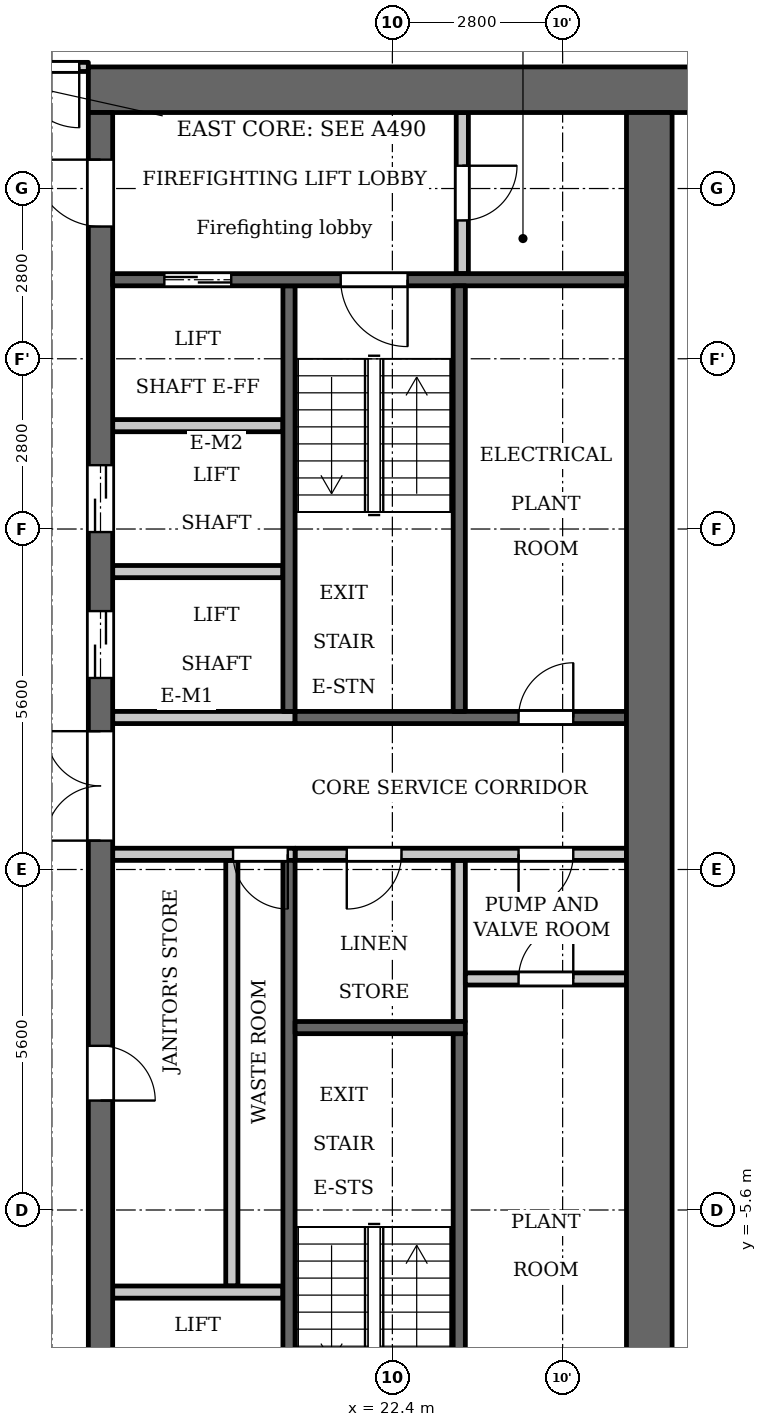
"""IFC4 building model, lengths in metres.
Left out: names, types, materials, properties, quantities, classifications, styles, units other than length and angle.
Written with IfcOpenShell. Run it as: python <this file> out.ifc"""

import sys

from ifc_helpers import new_model, si_unit, direction, frame, frame_2d, origin, place, context, subcontext, project, spatial, rectangle, extrude, element, fill, save


model = new_model("IFC4")
c1 = context("Model", 3, precision=1e-05, world=origin(), true_north=direction((0.0, 1.0)))
c2 = subcontext(c1, "Body", "Model", "MODEL_VIEW")
j1 = project(units=[si_unit("LENGTHUNIT", "METRE"), si_unit("PLANEANGLEUNIT", "RADIAN")], contexts=[c1])
p1 = place(None, origin())
s1 = spatial("IfcSite", under=j1, at=p1, CompositionType="ELEMENT")
p2 = place(p1, origin())
s2 = spatial("IfcBuilding", under=s1, at=p2, CompositionType="ELEMENT")
p3 = place(p2, frame((0.0, 0.0, 167.6)))
s3 = spatial("IfcBuildingStorey", under=s2, at=p3, CompositionType="ELEMENT", Elevation=167.6)
p4 = place(p3, frame((23.5, -2.5, 0.0), z_axis=(0.0, 0.0, 1.0), x_axis=(0.0, 1.0, 0.0)))
e1 = element("IfcWall", 1, at=p4, inside=s3, PredefinedType="PARTITIONING", context=c2, shape_type="SweptSolid", body=[
    extrude(rectangle(XDim=2.65, YDim=0.2, at=frame_2d((1.325, 0.0))), origin(), (0.0, 0.0, 1.0), 3.2),
])
p5 = place(p3, frame((20.7, 2.6, 0.0), z_axis=(0.0, 0.0, 1.0), x_axis=(0.0, 1.0, 0.0)))
e2 = element("IfcWall", 2, at=p5, inside=s3, PredefinedType="SHEAR", context=c2, shape_type="SweptSolid", body=[
    extrude(rectangle(XDim=7.0, YDim=0.2, at=frame_2d((3.5, 0.0))), origin(), (0.0, 0.0, 1.0), 3.2),
])
p6 = place(p3, frame((20.7, -9.6, 0.0), z_axis=(0.0, 0.0, 1.0), x_axis=(0.0, 1.0, 0.0)))
e3 = element("IfcWall", 3, at=p6, inside=s3, PredefinedType="SHEAR", context=c2, shape_type="SweptSolid", body=[
    extrude(rectangle(XDim=9.75, YDim=0.2, at=frame_2d((4.875, 0.0))), origin(), (0.0, 0.0, 1.0), 3.2),
])
p7 = place(p3, frame((20.8, 2.5, 0.0), z_axis=(0.0, 0.0, 1.0), x_axis=(1.0, 0.0, 0.0)))
e4 = element("IfcWall", 4, at=p7, inside=s3, PredefinedType="SHEAR", context=c2, shape_type="SweptSolid", body=[
    extrude(rectangle(XDim=5.45, YDim=0.2, at=frame_2d((2.725, 0.0))), origin(), (0.0, 0.0, 1.0), 3.2),
])
p8 = place(p7, frame((3.675, 0.0, 0.0)))
e5 = element("IfcOpeningElement", 5, at=p8, cuts=e4, PredefinedType="OPENING", context=c2, shape_type="SweptSolid", body=[
    extrude(rectangle(XDim=0.9, YDim=2.1, at=frame_2d((0.45, 1.05))), frame((0.0, 0.11, 0.0), z_axis=(0.0, -1.0, 0.0), x_axis=(1.0, 0.0, 0.0)), (0.0, 0.0, 1.0), 0.22),
])
p9 = place(p3, frame((20.8, 0.25, 0.0), z_axis=(0.0, 0.0, 1.0), x_axis=(1.0, 0.0, 0.0)))
e6 = element("IfcWall", 6, at=p9, inside=s3, PredefinedType="PARTITIONING", context=c2, shape_type="SweptSolid", body=[
    extrude(rectangle(XDim=5.45, YDim=0.2, at=frame_2d((2.725, 0.0))), origin(), (0.0, 0.0, 1.0), 3.2),
])
p10 = place(p9, frame((0.85, 0.0, 0.0)))
e7 = element("IfcOpeningElement", 7, at=p10, cuts=e6, PredefinedType="OPENING", context=c2, shape_type="SweptSolid", body=[
    extrude(rectangle(XDim=0.9, YDim=2.1, at=frame_2d((0.45, 1.05))), frame((0.0, 0.11, 0.0), z_axis=(0.0, -1.0, 0.0), x_axis=(1.0, 0.0, 0.0)), (0.0, 0.0, 1.0), 0.22),
])
p11 = place(p9, frame((3.675, 0.0, 0.0)))
e8 = element("IfcOpeningElement", 8, at=p11, cuts=e6, PredefinedType="OPENING", context=c2, shape_type="SweptSolid", body=[
    extrude(rectangle(XDim=0.9, YDim=2.1, at=frame_2d((0.45, 1.05))), frame((0.0, 0.11, 0.0), z_axis=(0.0, -1.0, 0.0), x_axis=(1.0, 0.0, 0.0)), (0.0, 0.0, 1.0), 0.22),
])
p12 = place(p3, frame((17.4, 12.825, 0.0), z_axis=(0.0, 0.0, 1.0), x_axis=(1.0, 0.0, 0.0)))
e9 = element("IfcWall", 9, at=p12, inside=s3, PredefinedType="SHEAR", context=c2, shape_type="SweptSolid", body=[
    extrude(rectangle(XDim=10.4, YDim=0.75, at=frame_2d((5.2, 0.0))), origin(), (0.0, 0.0, 1.0), 3.2),
])
p13 = place(p3, frame((19.76, -6.85, 0.0), z_axis=(0.0, 0.0, 1.0), x_axis=(0.0, 1.0, 0.0)))
e10 = element("IfcWall", 10, at=p13, inside=s3, PredefinedType="PARTITIONING", context=c2, shape_type="SweptSolid", body=[
    extrude(rectangle(XDim=7.0, YDim=0.2, at=frame_2d((3.5, 0.0))), origin(), (0.0, 0.0, 1.0), 3.2),
])
p14 = place(p3, frame((17.6, -12.45, 0.0), z_axis=(0.0, 0.0, 1.0), x_axis=(0.0, 1.0, 0.0)))
e11 = element("IfcWall", 11, at=p14, inside=s3, PredefinedType="SHEAR", context=c2, shape_type="SweptSolid", body=[
    extrude(rectangle(XDim=24.9, YDim=0.4, at=frame_2d((12.45, 0.0))), origin(), (0.0, 0.0, 1.0), 3.2),
])
p15 = place(p14, frame((8.65, 0.0, 0.0)))
e12 = element("IfcOpeningElement", 12, at=p15, cuts=e11, PredefinedType="OPENING", context=c2, shape_type="SweptSolid", body=[
    extrude(rectangle(XDim=0.9, YDim=2.1, at=frame_2d((0.45, 1.05))), frame((0.0, 0.21, 0.0), z_axis=(0.0, -1.0, 0.0), x_axis=(1.0, 0.0, 0.0)), (0.0, 0.0, 1.0), 0.42),
])
p16 = place(p14, frame((15.6, 0.0, 0.0)))
e13 = element("IfcOpeningElement", 13, at=p16, cuts=e11, PredefinedType="OPENING", context=c2, shape_type="SweptSolid", body=[
    extrude(rectangle(XDim=1.1, YDim=2.1, at=frame_2d((0.55, 1.05))), frame((0.0, 0.21, 0.0), z_axis=(0.0, -1.0, 0.0), x_axis=(1.0, 0.0, 0.0)), (0.0, 0.0, 1.0), 0.42),
])
p17 = place(p14, frame((18.0, 0.0, 0.0)))
e14 = element("IfcOpeningElement", 14, at=p17, cuts=e11, PredefinedType="OPENING", context=c2, shape_type="SweptSolid", body=[
    extrude(rectangle(XDim=1.1, YDim=2.1, at=frame_2d((0.55, 1.05))), frame((0.0, 0.21, 0.0), z_axis=(0.0, -1.0, 0.0), x_axis=(1.0, 0.0, 0.0)), (0.0, 0.0, 1.0), 0.42),
])
p18 = place(p14, frame((23.025, 0.0, 0.0)))
e15 = element("IfcOpeningElement", 15, at=p18, cuts=e11, PredefinedType="OPENING", context=c2, shape_type="SweptSolid", body=[
    extrude(rectangle(XDim=1.1, YDim=2.1, at=frame_2d((0.55, 1.05))), frame((0.0, 0.21, 0.0), z_axis=(0.0, -1.0, 0.0), x_axis=(1.0, 0.0, 0.0)), (0.0, 0.0, 1.0), 0.42),
])
p19 = place(p14, frame((0.775, 0.0, 0.0)))
e16 = element("IfcOpeningElement", 16, at=p19, cuts=e11, PredefinedType="OPENING", context=c2, shape_type="SweptSolid", body=[
    extrude(rectangle(XDim=1.1, YDim=2.1, at=frame_2d((0.55, 1.05))), frame((0.0, 0.21, 0.0), z_axis=(0.0, -1.0, 0.0), x_axis=(1.0, 0.0, 0.0)), (0.0, 0.0, 1.0), 0.42),
])
p20 = place(p14, frame((12.925, 0.0, 0.0)))
e17 = element("IfcOpeningElement", 17, at=p20, cuts=e11, PredefinedType="OPENING", context=c2, shape_type="SweptSolid", body=[
    extrude(rectangle(XDim=1.8, YDim=2.1, at=frame_2d((0.9, 1.05))), frame((0.0, 0.21, 0.0), z_axis=(0.0, -1.0, 0.0), x_axis=(1.0, 0.0, 0.0)), (0.0, 0.0, 1.0), 0.42),
])
p21 = place(p3, frame((26.625, -12.45, 0.0), z_axis=(0.0, 0.0, 1.0), x_axis=(0.0, 1.0, 0.0)))
e18 = element("IfcWall", 18, at=p21, inside=s3, PredefinedType="SHEAR", context=c2, shape_type="SweptSolid", body=[
    extrude(rectangle(XDim=24.9, YDim=0.75, at=frame_2d((12.45, 0.0))), origin(), (0.0, 0.0, 1.0), 3.2),
])
p22 = place(p3, frame((23.55, 9.8, 0.0), z_axis=(0.0, 0.0, 1.0), x_axis=(0.0, 1.0, 0.0)))
e19 = element("IfcWall", 19, at=p22, inside=s3, PredefinedType="PARTITIONING", context=c2, shape_type="SweptSolid", body=[
    extrude(rectangle(XDim=2.65, YDim=0.2, at=frame_2d((1.325, 0.0))), origin(), (0.0, 0.0, 1.0), 3.2),
])
p23 = place(p22, frame((0.875, 0.0, 0.0)))
e20 = element("IfcOpeningElement", 20, at=p23, cuts=e19, PredefinedType="OPENING", context=c2, shape_type="SweptSolid", body=[
    extrude(rectangle(XDim=0.9, YDim=2.1, at=frame_2d((0.45, 1.05))), frame((0.0, 0.11, 0.0), z_axis=(0.0, -1.0, 0.0), x_axis=(1.0, 0.0, 0.0)), (0.0, 0.0, 1.0), 0.22),
])
p24 = place(p3, frame((23.6, -1.8, 0.0), z_axis=(0.0, 0.0, 1.0), x_axis=(1.0, 0.0, 0.0)))
e21 = element("IfcWall", 21, at=p24, inside=s3, PredefinedType="PARTITIONING", context=c2, shape_type="SweptSolid", body=[
    extrude(rectangle(XDim=2.65, YDim=0.2, at=frame_2d((1.325, 0.0))), origin(), (0.0, 0.0, 1.0), 3.2),
])
p25 = place(p24, frame((0.875, 0.0, 0.0)))
e22 = element("IfcOpeningElement", 22, at=p25, cuts=e21, PredefinedType="OPENING", context=c2, shape_type="SweptSolid", body=[
    extrude(rectangle(XDim=0.9, YDim=2.1, at=frame_2d((0.45, 1.05))), frame((0.0, 0.11, 0.0), z_axis=(0.0, -1.0, 0.0), x_axis=(1.0, 0.0, 0.0)), (0.0, 0.0, 1.0), 0.22),
])
p26 = place(p3, frame((17.8, -6.95, 0.0), z_axis=(0.0, 0.0, 1.0), x_axis=(1.0, 0.0, 0.0)))
e23 = element("IfcWall", 23, at=p26, inside=s3, PredefinedType="PARTITIONING", context=c2, shape_type="SweptSolid", body=[
    extrude(rectangle(XDim=2.8, YDim=0.2, at=frame_2d((1.4, 0.0))), origin(), (0.0, 0.0, 1.0), 3.2),
])
p27 = place(p3, frame((17.8, 0.25, 0.0), z_axis=(0.0, 0.0, 1.0), x_axis=(1.0, 0.0, 0.0)))
e24 = element("IfcWall", 24, at=p27, inside=s3, PredefinedType="PARTITIONING", context=c2, shape_type="SweptSolid", body=[
    extrude(rectangle(XDim=3.0, YDim=0.2, at=frame_2d((1.5, 0.0))), origin(), (0.0, 0.0, 1.0), 3.2),
])
p28 = place(p27, frame((1.98, 0.0, 0.0)))
e25 = element("IfcOpeningElement", 25, at=p28, cuts=e24, PredefinedType="OPENING", context=c2, shape_type="SweptSolid", body=[
    extrude(rectangle(XDim=0.9, YDim=2.1, at=frame_2d((0.45, 1.05))), frame((0.0, 0.11, 0.0), z_axis=(0.0, -1.0, 0.0), x_axis=(1.0, 0.0, 0.0)), (0.0, 0.0, 1.0), 0.22),
])
p29 = place(p3, frame((17.8, 2.5, 0.0), z_axis=(0.0, 0.0, 1.0), x_axis=(1.0, 0.0, 0.0)))
e26 = element("IfcWall", 26, at=p29, inside=s3, PredefinedType="PARTITIONING", context=c2, shape_type="SweptSolid", body=[
    extrude(rectangle(XDim=3.0, YDim=0.2, at=frame_2d((1.5, 0.0))), origin(), (0.0, 0.0, 1.0), 3.2),
])
for number, where, z_axis, x_axis in (
    (27, (17.8, 4.9, 0.0), (0.0, 0.0, 1.0), (1.0, 0.0, 0.0)),
    (28, (17.8, 7.3, 0.0), (0.0, 0.0, 1.0), (1.0, 0.0, 0.0)),
):
    element("IfcWall", number, at=place(p3, frame(where, z_axis=z_axis, x_axis=x_axis)), inside=s3, PredefinedType="PARTITIONING", context=c2, shape_type="SweptSolid", body=[
        extrude(rectangle(XDim=2.8, YDim=0.2, at=frame_2d((1.4, 0.0))), origin(), (0.0, 0.0, 1.0), 3.2),
    ])
p30 = place(p3, frame((17.8, 9.7, 0.0), z_axis=(0.0, 0.0, 1.0), x_axis=(1.0, 0.0, 0.0)))
e29 = element("IfcWall", 29, at=p30, inside=s3, PredefinedType="SHEAR", context=c2, shape_type="SweptSolid", body=[
    extrude(rectangle(XDim=8.45, YDim=0.2, at=frame_2d((4.225, 0.0))), origin(), (0.0, 0.0, 1.0), 3.2),
])
p31 = place(p30, frame((0.85, 0.0, 0.0)))
e30 = element("IfcOpeningElement", 30, at=p31, cuts=e29, PredefinedType="OPENING", context=c2, shape_type="SweptSolid", body=[
    extrude(rectangle(XDim=1.1, YDim=2.1, at=frame_2d((0.55, 1.05))), frame((0.0, 0.11, 0.0), z_axis=(0.0, -1.0, 0.0), x_axis=(1.0, 0.0, 0.0)), (0.0, 0.0, 1.0), 0.22),
])
p32 = place(p30, frame((3.75, 0.0, 0.0)))
e31 = element("IfcOpeningElement", 31, at=p32, cuts=e29, PredefinedType="OPENING", context=c2, shape_type="SweptSolid", body=[
    extrude(rectangle(XDim=1.1, YDim=2.1, at=frame_2d((0.55, 1.05))), frame((0.0, 0.11, 0.0), z_axis=(0.0, -1.0, 0.0), x_axis=(1.0, 0.0, 0.0)), (0.0, 0.0, 1.0), 0.22),
])
p33 = place(p3, frame((23.5, 2.6, 0.0), z_axis=(0.0, 0.0, 1.0), x_axis=(0.0, 1.0, 0.0)))
e32 = element("IfcWall", 32, at=p33, inside=s3, PredefinedType="SHEAR", context=c2, shape_type="SweptSolid", body=[
    extrude(rectangle(XDim=7.0, YDim=0.2, at=frame_2d((3.5, 0.0))), origin(), (0.0, 0.0, 1.0), 3.2),
])
p34 = place(p3, frame((23.5, -9.6, 0.0), z_axis=(0.0, 0.0, 1.0), x_axis=(0.0, 1.0, 0.0)))
e33 = element("IfcWall", 33, at=p34, inside=s3, PredefinedType="SHEAR", context=c2, shape_type="SweptSolid", body=[
    extrude(rectangle(XDim=6.9, YDim=0.2, at=frame_2d((3.45, 0.0))), origin(), (0.0, 0.0, 1.0), 3.2),
])
p35 = place(p3, frame((20.8, -2.6, 0.0), z_axis=(0.0, 0.0, 1.0), x_axis=(1.0, 0.0, 0.0)))
e34 = element("IfcWall", 34, at=p35, inside=s3, PredefinedType="SHEAR", context=c2, shape_type="SweptSolid", body=[
    extrude(rectangle(XDim=2.8, YDim=0.2, at=frame_2d((1.4, 0.0))), origin(), (0.0, 0.0, 1.0), 3.2),
])
p36 = place(p3, frame((-17.4, 13.2, 0.0), z_axis=(0.0, 0.0, 1.0), x_axis=(1.0, 0.0, 0.0)))
e35 = element("IfcWall", 35, at=p36, inside=s3, PredefinedType="PARTITIONING", context=c2, shape_type="SweptSolid", body=[
    extrude(rectangle(XDim=34.8, YDim=0.15, at=frame_2d((17.4, 0.0))), origin(), (0.0, 0.0, 1.0), 3.2),
])
p37 = place(p36, frame((0.25, 0.0, 0.0)))
e36 = element("IfcOpeningElement", 36, at=p37, cuts=e35, PredefinedType="OPENING", context=c2, shape_type="SweptSolid", body=[
    extrude(rectangle(XDim=1.0, YDim=2.1, at=frame_2d((0.5, 1.05))), frame((0.0, 0.085, 0.0), z_axis=(0.0, -1.0, 0.0), x_axis=(1.0, 0.0, 0.0)), (0.0, 0.0, 1.0), 0.17),
])
p38 = place(p36, frame((33.65, 0.0, 0.0)))
e37 = element("IfcOpeningElement", 37, at=p38, cuts=e35, PredefinedType="OPENING", context=c2, shape_type="SweptSolid", body=[
    extrude(rectangle(XDim=1.0, YDim=2.1, at=frame_2d((0.5, 1.05))), frame((0.0, 0.085, 0.0), z_axis=(0.0, -1.0, 0.0), x_axis=(1.0, 0.0, 0.0)), (0.0, 0.0, 1.0), 0.17),
])
p39 = place(p36, frame((10.15, 0.0, 0.0)))
e38 = element("IfcOpeningElement", 38, at=p39, cuts=e35, PredefinedType="OPENING", context=c2, shape_type="SweptSolid", body=[
    extrude(rectangle(XDim=1.0, YDim=2.1, at=frame_2d((0.5, 1.05))), frame((0.0, 0.085, 0.0), z_axis=(0.0, -1.0, 0.0), x_axis=(1.0, 0.0, 0.0)), (0.0, 0.0, 1.0), 0.17),
])
p40 = place(p36, frame((15.75, 0.0, 0.0)))
e39 = element("IfcOpeningElement", 39, at=p40, cuts=e35, PredefinedType="OPENING", context=c2, shape_type="SweptSolid", body=[
    extrude(rectangle(XDim=1.0, YDim=2.1, at=frame_2d((0.5, 1.05))), frame((0.0, 0.085, 0.0), z_axis=(0.0, -1.0, 0.0), x_axis=(1.0, 0.0, 0.0)), (0.0, 0.0, 1.0), 0.17),
])
p41 = place(p36, frame((24.95, 0.0, 0.0)))
e40 = element("IfcOpeningElement", 40, at=p41, cuts=e35, PredefinedType="OPENING", context=c2, shape_type="SweptSolid", body=[
    extrude(rectangle(XDim=1.0, YDim=2.1, at=frame_2d((0.5, 1.05))), frame((0.0, 0.085, 0.0), z_axis=(0.0, -1.0, 0.0), x_axis=(1.0, 0.0, 0.0)), (0.0, 0.0, 1.0), 0.17),
])
p42 = place(p36, frame((29.95, 0.0, 0.0)))
e41 = element("IfcOpeningElement", 41, at=p42, cuts=e35, PredefinedType="OPENING", context=c2, shape_type="SweptSolid", body=[
    extrude(rectangle(XDim=1.0, YDim=2.1, at=frame_2d((0.5, 1.05))), frame((0.0, 0.085, 0.0), z_axis=(0.0, -1.0, 0.0), x_axis=(1.0, 0.0, 0.0)), (0.0, 0.0, 1.0), 0.17),
])
p43 = place(p15, origin())
e42 = element("IfcDoor", 42, at=p43, inside=s3, OperationType="SINGLE_SWING_LEFT", PredefinedType="DOOR", context=c2, shape_type="SweptSolid", body=[
    extrude(rectangle(XDim=0.9, YDim=2.1, at=frame_2d((0.45, 1.05))), frame((0.0, 0.025, 0.0), z_axis=(0.0, -1.0, 0.0), x_axis=(1.0, 0.0, 0.0)), (0.0, 0.0, 1.0), 0.05),
])
fill(e12, e42)
p44 = place(p28, origin())
e43 = element("IfcDoor", 43, at=p44, inside=s3, OperationType="SINGLE_SWING_RIGHT", PredefinedType="DOOR", context=c2, shape_type="SweptSolid", body=[
    extrude(rectangle(XDim=0.9, YDim=2.1, at=frame_2d((0.45, 1.05))), frame((0.0, 0.025, 0.0), z_axis=(0.0, -1.0, 0.0), x_axis=(1.0, 0.0, 0.0)), (0.0, 0.0, 1.0), 0.05),
])
fill(e25, e43)
p45 = place(p16, origin())
e44 = element("IfcDoor", 44, at=p45, inside=s3, OperationType="DOUBLE_DOOR_SLIDING", PredefinedType="DOOR", context=c2, shape_type="SweptSolid", body=[
    extrude(rectangle(XDim=1.1, YDim=2.1, at=frame_2d((0.55, 1.05))), frame((0.0, 0.025, 0.0), z_axis=(0.0, -1.0, 0.0), x_axis=(1.0, 0.0, 0.0)), (0.0, 0.0, 1.0), 0.05),
])
fill(e13, e44)
p46 = place(p17, origin())
e45 = element("IfcDoor", 45, at=p46, inside=s3, OperationType="DOUBLE_DOOR_SLIDING", PredefinedType="DOOR", context=c2, shape_type="SweptSolid", body=[
    extrude(rectangle(XDim=1.1, YDim=2.1, at=frame_2d((0.55, 1.05))), frame((0.0, 0.025, 0.0), z_axis=(0.0, -1.0, 0.0), x_axis=(1.0, 0.0, 0.0)), (0.0, 0.0, 1.0), 0.05),
])
fill(e14, e45)
p47 = place(p31, origin())
e46 = element("IfcDoor", 46, at=p47, inside=s3, OperationType="DOUBLE_DOOR_SLIDING", PredefinedType="DOOR", context=c2, shape_type="SweptSolid", body=[
    extrude(rectangle(XDim=1.1, YDim=2.1, at=frame_2d((0.55, 1.05))), frame((0.0, 0.025, 0.0), z_axis=(0.0, -1.0, 0.0), x_axis=(1.0, 0.0, 0.0)), (0.0, 0.0, 1.0), 0.05),
])
fill(e30, e46)
p48 = place(p18, origin())
e47 = element("IfcDoor", 47, at=p48, inside=s3, OperationType="SINGLE_SWING_LEFT", PredefinedType="DOOR", context=c2, shape_type="SweptSolid", body=[
    extrude(rectangle(XDim=1.1, YDim=2.1, at=frame_2d((0.55, 1.05))), frame((0.0, 0.025, 0.0), z_axis=(0.0, -1.0, 0.0), x_axis=(1.0, 0.0, 0.0)), (0.0, 0.0, 1.0), 0.05),
])
fill(e15, e47)
p49 = place(p23, origin())
e48 = element("IfcDoor", 48, at=p49, inside=s3, OperationType="SINGLE_SWING_RIGHT", PredefinedType="DOOR", context=c2, shape_type="SweptSolid", body=[
    extrude(rectangle(XDim=0.9, YDim=2.1, at=frame_2d((0.45, 1.05))), frame((0.0, 0.025, 0.0), z_axis=(0.0, -1.0, 0.0), x_axis=(1.0, 0.0, 0.0)), (0.0, 0.0, 1.0), 0.05),
])
fill(e20, e48)
p50 = place(p32, origin())
e49 = element("IfcDoor", 49, at=p50, inside=s3, OperationType="SINGLE_SWING_RIGHT", PredefinedType="DOOR", context=c2, shape_type="SweptSolid", body=[
    extrude(rectangle(XDim=1.1, YDim=2.1, at=frame_2d((0.55, 1.05))), frame((0.0, 0.025, 0.0), z_axis=(0.0, -1.0, 0.0), x_axis=(1.0, 0.0, 0.0)), (0.0, 0.0, 1.0), 0.05),
])
fill(e31, e49)
p51 = place(p20, origin())
e50 = element("IfcDoor", 50, at=p51, inside=s3, OperationType="DOUBLE_DOOR_SINGLE_SWING", PredefinedType="DOOR", context=c2, shape_type="SweptSolid", body=[
    extrude(rectangle(XDim=1.8, YDim=2.1, at=frame_2d((0.9, 1.05))), frame((0.0, 0.025, 0.0), z_axis=(0.0, -1.0, 0.0), x_axis=(1.0, 0.0, 0.0)), (0.0, 0.0, 1.0), 0.05),
])
fill(e17, e50)
p52 = place(p10, origin())
e51 = element("IfcDoor", 51, at=p52, inside=s3, OperationType="SINGLE_SWING_LEFT", PredefinedType="DOOR", context=c2, shape_type="SweptSolid", body=[
    extrude(rectangle(XDim=0.9, YDim=2.1, at=frame_2d((0.45, 1.05))), frame((0.0, 0.025, 0.0), z_axis=(0.0, -1.0, 0.0), x_axis=(1.0, 0.0, 0.0)), (0.0, 0.0, 1.0), 0.05),
])
fill(e7, e51)
p53 = place(p25, origin())
e52 = element("IfcDoor", 52, at=p53, inside=s3, OperationType="SINGLE_SWING_LEFT", PredefinedType="DOOR", context=c2, shape_type="SweptSolid", body=[
    extrude(rectangle(XDim=0.9, YDim=2.1, at=frame_2d((0.45, 1.05))), frame((0.0, 0.025, 0.0), z_axis=(0.0, -1.0, 0.0), x_axis=(1.0, 0.0, 0.0)), (0.0, 0.0, 1.0), 0.05),
])
fill(e22, e52)
p54 = place(p11, origin())
e53 = element("IfcDoor", 53, at=p54, inside=s3, OperationType="SINGLE_SWING_LEFT", PredefinedType="DOOR", context=c2, shape_type="SweptSolid", body=[
    extrude(rectangle(XDim=0.9, YDim=2.1, at=frame_2d((0.45, 1.05))), frame((0.0, 0.025, 0.0), z_axis=(0.0, -1.0, 0.0), x_axis=(1.0, 0.0, 0.0)), (0.0, 0.0, 1.0), 0.05),
])
fill(e8, e53)
p55 = place(p8, origin())
e54 = element("IfcDoor", 54, at=p55, inside=s3, OperationType="SINGLE_SWING_LEFT", PredefinedType="DOOR", context=c2, shape_type="SweptSolid", body=[
    extrude(rectangle(XDim=0.9, YDim=2.1, at=frame_2d((0.45, 1.05))), frame((0.0, 0.025, 0.0), z_axis=(0.0, -1.0, 0.0), x_axis=(1.0, 0.0, 0.0)), (0.0, 0.0, 1.0), 0.05),
])
fill(e5, e54)
p56 = place(p38, origin())
e55 = element("IfcDoor", 55, at=p56, inside=s3, OperationType="SINGLE_SWING_RIGHT", PredefinedType="DOOR", context=c2, shape_type="SweptSolid", body=[
    extrude(rectangle(XDim=1.0, YDim=2.1, at=frame_2d((0.5, 1.05))), frame((0.0, 0.025, 0.0), z_axis=(0.0, -1.0, 0.0), x_axis=(1.0, 0.0, 0.0)), (0.0, 0.0, 1.0), 0.05),
])
fill(e37, e55)
save(model, sys.argv[1])
